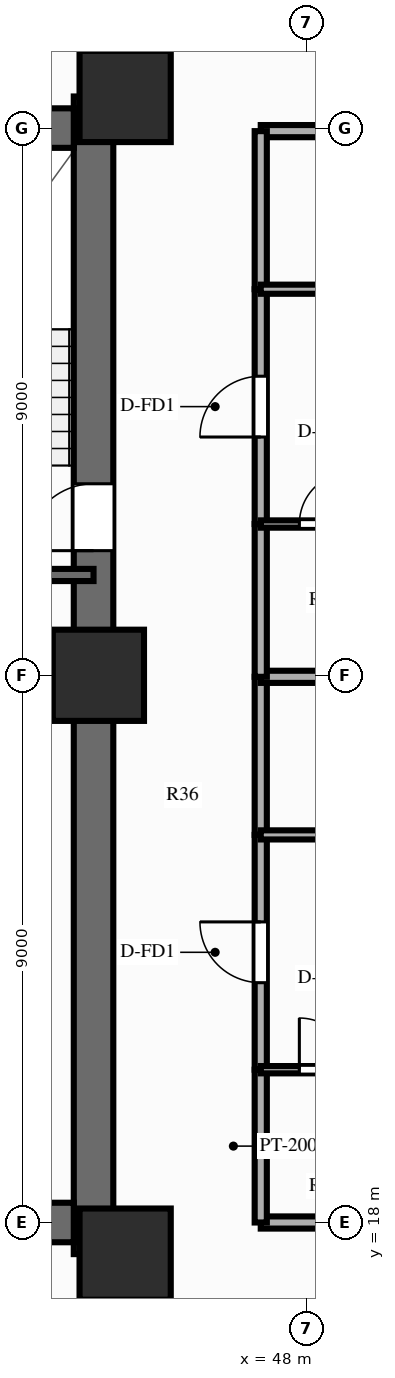
"""IFC4 building model, lengths in metres.
Left out: names, types, materials, properties, quantities, classifications, styles, units other than length and angle.
Written with IfcOpenShell. Run it as: python <this file> out.ifc"""

import sys

from ifc_helpers import new_model, si_unit, direction, frame, frame_2d, origin, origin_2d, place, context, subcontext, project, spatial, rectangle, extrude, source, transform, mapped, element, fill, save


model = new_model("IFC4")
c1 = context("Model", 3, precision=1e-05, world=origin(), true_north=direction((0.0, 1.0)))
c2 = subcontext(c1, "Body", "Model", "MODEL_VIEW")
j1 = project(units=[si_unit("LENGTHUNIT", "METRE"), si_unit("PLANEANGLEUNIT", "RADIAN")], contexts=[c1])
p1 = place(None, origin())
s1 = spatial("IfcSite", under=j1, at=p1, CompositionType="ELEMENT")
p2 = place(p1, origin())
s2 = spatial("IfcBuilding", under=s1, at=p2, CompositionType="ELEMENT")
p3 = place(p2, frame((0.0, 0.0, 22.4)))
s3 = spatial("IfcBuildingStorey", under=s2, at=p3, CompositionType="ELEMENT", Elevation=22.4)
p4 = place(p3, frame((44.5, 17.48, 0.0), z_axis=(0.0, 0.0, 1.0), x_axis=(0.0, 1.0, 0.0)))
e1 = element("IfcWall", 1, at=p4, inside=s3, PredefinedType="SHEAR", context=c2, shape_type="SweptSolid", body=[
    extrude(rectangle(XDim=19.04, YDim=0.65, at=frame_2d((9.52, 0.0))), origin(), (0.0, 0.0, 1.0), 3.0),
])
p5 = place(p4, frame((12.67, 0.0, 0.0), z_axis=(0.0, 0.0, 1.0), x_axis=(-1.0, 0.0, 0.0)))
e2 = element("IfcOpeningElement", 2, at=p5, cuts=e1, PredefinedType="OPENING", context=c2, shape_type="SweptSolid", body=[
    extrude(rectangle(XDim=1.1, YDim=2.15, at=frame_2d((0.55, 1.075))), frame((0.0, 0.337, 0.0), z_axis=(0.0, -1.0, 0.0), x_axis=(1.0, 0.0, 0.0)), (0.0, 0.0, 1.0), 0.674),
])
p6 = place(p3, frame((31.825, 18.0, 0.0), z_axis=(0.0, 0.0, 1.0), x_axis=(1.0, 0.0, 0.0)))
e3 = element("IfcWall", 3, at=p6, inside=s3, PredefinedType="SHEAR", context=c2, shape_type="SweptSolid", body=[
    extrude(rectangle(XDim=12.35, YDim=0.65, at=frame_2d((6.175, 0.0))), origin(), (0.0, 0.0, 1.0), 3.0),
])
p7 = place(p3, frame((31.825, 36.0, 0.0), z_axis=(0.0, 0.0, 1.0), x_axis=(1.0, 0.0, 0.0)))
e4 = element("IfcWall", 4, at=p7, inside=s3, PredefinedType="SHEAR", context=c2, shape_type="SweptSolid", body=[
    extrude(rectangle(XDim=12.35, YDim=0.65, at=frame_2d((6.175, 0.0))), origin(), (0.0, 0.0, 1.0), 3.0),
])
p8 = place(p7, frame((5.125, 0.0, 0.0), z_axis=(0.0, 0.0, 1.0), x_axis=(-1.0, 0.0, 0.0)))
e5 = element("IfcOpeningElement", 5, at=p8, cuts=e4, PredefinedType="OPENING", context=c2, shape_type="SweptSolid", body=[
    extrude(rectangle(XDim=1.4, YDim=2.15, at=frame_2d((0.7, 1.075))), frame((0.0, 0.337, 0.0), z_axis=(0.0, -1.0, 0.0), x_axis=(1.0, 0.0, 0.0)), (0.0, 0.0, 1.0), 0.674),
])
m1 = source(origin(), c2, "Body", "SweptSolid", [
    extrude(rectangle(XDim=1.5, YDim=1.5, at=origin_2d()), origin(), (0.0, 0.0, 1.0), 3.0),
])
for number, where, z_axis, x_axis in (
    (6, (45.02, 17.48, 0.0), (0.0, 0.0, 1.0), (1.0, 0.0, 0.0)),
    (7, (45.02, 36.52, 0.0), (0.0, 0.0, 1.0), (1.0, 0.0, 0.0)),
    (8, (44.58, 27.0, 0.0), (0.0, 0.0, 1.0), (1.0, 0.0, 0.0)),
):
    element("IfcColumn", number, at=place(p3, frame(where, z_axis=z_axis, x_axis=x_axis)), inside=s3, PredefinedType="COLUMN", context=c2, shape_type="MappedRepresentation", body=[
        mapped(m1, transform((0.0, 0.0, 0.0), scale=1.0)),
    ])
p9 = place(p3, frame((40.57, 28.65, 0.0), z_axis=(0.0, 0.0, 1.0), x_axis=(1.0, 0.0, 0.0)))
e9 = element("IfcWall", 9, at=p9, inside=s3, PredefinedType="SOLIDWALL", context=c2, shape_type="SweptSolid", body=[
    extrude(rectangle(XDim=3.93, YDim=0.2, at=frame_2d((1.965, 0.0))), origin(), (0.0, 0.0, 1.0), 2.79),
])
for number, where, z_axis, x_axis in (
    (10, (47.25, 18.0, 0.0), (0.0, 0.0, 1.0), (1.0, 0.0, 0.0)),
    (11, (47.25, 35.95, 0.0), (0.0, 0.0, 1.0), (1.0, 0.0, 0.0)),
):
    element("IfcWall", number, at=place(p3, frame(where, z_axis=z_axis, x_axis=x_axis)), inside=s3, PredefinedType="PARTITIONING", context=c2, shape_type="SweptSolid", body=[
        extrude(rectangle(XDim=16.6, YDim=0.2, at=frame_2d((8.3, 0.0))), origin(), (0.0, 0.0, 1.0), 2.24),
    ])
p10 = place(p3, frame((47.25, 18.0, 0.0), z_axis=(0.0, 0.0, 1.0), x_axis=(0.0, 1.0, 0.0)))
e12 = element("IfcWall", 12, at=p10, inside=s3, PredefinedType="PARTITIONING", context=c2, shape_type="SweptSolid", body=[
    extrude(rectangle(XDim=2.513, YDim=0.2, at=frame_2d((1.256, 0.0))), origin(), (0.0, 0.0, 1.0), 2.79),
])
p11 = place(p3, frame((47.25, 20.513, 0.0), z_axis=(0.0, 0.0, 1.0), x_axis=(0.0, 1.0, 0.0)))
e13 = element("IfcWall", 13, at=p11, inside=s3, PredefinedType="PARTITIONING", context=c2, shape_type="SweptSolid", body=[
    extrude(rectangle(XDim=3.862, YDim=0.2, at=frame_2d((1.931, 0.0))), origin(), (0.0, 0.0, 1.0), 2.79),
])
p12 = place(p11, frame((1.431, 0.0, 0.0)))
e14 = element("IfcOpeningElement", 14, at=p12, cuts=e13, PredefinedType="OPENING", context=c2, shape_type="SweptSolid", body=[
    extrude(rectangle(XDim=1.0, YDim=2.15, at=frame_2d((0.5, 1.075))), frame((0.0, 0.112, 0.0), z_axis=(0.0, -1.0, 0.0), x_axis=(1.0, 0.0, 0.0)), (0.0, 0.0, 1.0), 0.224),
])
p13 = place(p3, frame((47.25, 24.375, 0.0), z_axis=(0.0, 0.0, 1.0), x_axis=(0.0, 1.0, 0.0)))
e15 = element("IfcWall", 15, at=p13, inside=s3, PredefinedType="PARTITIONING", context=c2, shape_type="SweptSolid", body=[
    extrude(rectangle(XDim=2.6, YDim=0.2, at=frame_2d((1.3, 0.0))), origin(), (0.0, 0.0, 1.0), 2.79),
])
p14 = place(p3, frame((47.25, 20.513, 0.0), z_axis=(0.0, 0.0, 1.0), x_axis=(1.0, 0.0, 0.0)))
e16 = element("IfcWall", 16, at=p14, inside=s3, PredefinedType="PARTITIONING", context=c2, shape_type="SweptSolid", body=[
    extrude(rectangle(XDim=2.12, YDim=0.12, at=frame_2d((1.06, 0.0))), origin(), (0.0, 0.0, 1.0), 2.79),
])
p15 = place(p14, frame((0.635, 0.0, 0.0)))
e17 = element("IfcOpeningElement", 17, at=p15, cuts=e16, PredefinedType="OPENING", context=c2, shape_type="SweptSolid", body=[
    extrude(rectangle(XDim=0.85, YDim=2.05, at=frame_2d((0.425, 1.025))), frame((0.0, 0.072, 0.0), z_axis=(0.0, -1.0, 0.0), x_axis=(1.0, 0.0, 0.0)), (0.0, 0.0, 1.0), 0.144),
])
p16 = place(p3, frame((47.25, 24.375, 0.0), z_axis=(0.0, 0.0, 1.0), x_axis=(1.0, 0.0, 0.0)))
e18 = element("IfcWall", 18, at=p16, inside=s3, PredefinedType="PARTITIONING", context=c2, shape_type="SweptSolid", body=[
    extrude(rectangle(XDim=3.07, YDim=0.15, at=frame_2d((1.535, 0.0))), origin(), (0.0, 0.0, 1.0), 2.79),
])
p17 = place(p16, frame((1.085, 0.0, 0.0)))
e19 = element("IfcOpeningElement", 19, at=p17, cuts=e18, PredefinedType="OPENING", context=c2, shape_type="SweptSolid", body=[
    extrude(rectangle(XDim=0.9, YDim=2.1, at=frame_2d((0.45, 1.05))), frame((0.0, 0.087, 0.0), z_axis=(0.0, -1.0, 0.0), x_axis=(1.0, 0.0, 0.0)), (0.0, 0.0, 1.0), 0.174),
])
p18 = place(p3, frame((47.25, 26.975, 0.0), z_axis=(0.0, 0.0, 1.0), x_axis=(1.0, 0.0, 0.0)))
e20 = element("IfcWall", 20, at=p18, inside=s3, PredefinedType="PARTITIONING", context=c2, shape_type="SweptSolid", body=[
    extrude(rectangle(XDim=16.6, YDim=0.2, at=frame_2d((8.3, 0.0))), origin(), (0.0, 0.0, 1.0), 2.79),
])
p19 = place(p3, frame((47.25, 26.975, 0.0), z_axis=(0.0, 0.0, 1.0), x_axis=(0.0, 1.0, 0.0)))
e21 = element("IfcWall", 21, at=p19, inside=s3, PredefinedType="PARTITIONING", context=c2, shape_type="SweptSolid", body=[
    extrude(rectangle(XDim=2.513, YDim=0.2, at=frame_2d((1.256, 0.0))), origin(), (0.0, 0.0, 1.0), 2.79),
])
p20 = place(p3, frame((47.25, 29.488, 0.0), z_axis=(0.0, 0.0, 1.0), x_axis=(0.0, 1.0, 0.0)))
e22 = element("IfcWall", 22, at=p20, inside=s3, PredefinedType="PARTITIONING", context=c2, shape_type="SweptSolid", body=[
    extrude(rectangle(XDim=3.862, YDim=0.2, at=frame_2d((1.931, 0.0))), origin(), (0.0, 0.0, 1.0), 2.79),
])
p21 = place(p20, frame((1.431, 0.0, 0.0)))
e23 = element("IfcOpeningElement", 23, at=p21, cuts=e22, PredefinedType="OPENING", context=c2, shape_type="SweptSolid", body=[
    extrude(rectangle(XDim=1.0, YDim=2.15, at=frame_2d((0.5, 1.075))), frame((0.0, 0.112, 0.0), z_axis=(0.0, -1.0, 0.0), x_axis=(1.0, 0.0, 0.0)), (0.0, 0.0, 1.0), 0.224),
])
p22 = place(p3, frame((47.25, 33.35, 0.0), z_axis=(0.0, 0.0, 1.0), x_axis=(0.0, 1.0, 0.0)))
e24 = element("IfcWall", 24, at=p22, inside=s3, PredefinedType="PARTITIONING", context=c2, shape_type="SweptSolid", body=[
    extrude(rectangle(XDim=2.6, YDim=0.2, at=frame_2d((1.3, 0.0))), origin(), (0.0, 0.0, 1.0), 2.79),
])
p23 = place(p3, frame((47.25, 29.488, 0.0), z_axis=(0.0, 0.0, 1.0), x_axis=(1.0, 0.0, 0.0)))
e25 = element("IfcWall", 25, at=p23, inside=s3, PredefinedType="PARTITIONING", context=c2, shape_type="SweptSolid", body=[
    extrude(rectangle(XDim=2.12, YDim=0.12, at=frame_2d((1.06, 0.0))), origin(), (0.0, 0.0, 1.0), 2.79),
])
p24 = place(p23, frame((0.635, 0.0, 0.0)))
e26 = element("IfcOpeningElement", 26, at=p24, cuts=e25, PredefinedType="OPENING", context=c2, shape_type="SweptSolid", body=[
    extrude(rectangle(XDim=0.85, YDim=2.05, at=frame_2d((0.425, 1.025))), frame((0.0, 0.072, 0.0), z_axis=(0.0, -1.0, 0.0), x_axis=(1.0, 0.0, 0.0)), (0.0, 0.0, 1.0), 0.144),
])
p25 = place(p3, frame((47.25, 33.35, 0.0), z_axis=(0.0, 0.0, 1.0), x_axis=(1.0, 0.0, 0.0)))
e27 = element("IfcWall", 27, at=p25, inside=s3, PredefinedType="PARTITIONING", context=c2, shape_type="SweptSolid", body=[
    extrude(rectangle(XDim=3.07, YDim=0.15, at=frame_2d((1.535, 0.0))), origin(), (0.0, 0.0, 1.0), 2.79),
])
p26 = place(p25, frame((1.085, 0.0, 0.0)))
e28 = element("IfcOpeningElement", 28, at=p26, cuts=e27, PredefinedType="OPENING", context=c2, shape_type="SweptSolid", body=[
    extrude(rectangle(XDim=0.9, YDim=2.1, at=frame_2d((0.45, 1.05))), frame((0.0, 0.087, 0.0), z_axis=(0.0, -1.0, 0.0), x_axis=(1.0, 0.0, 0.0)), (0.0, 0.0, 1.0), 0.174),
])
m2 = source(origin(), c2, "Body", "SweptSolid", [
    extrude(rectangle(XDim=1.1, YDim=2.15, at=frame_2d((0.55, 1.075))), frame((0.0, 0.025, 0.0), z_axis=(0.0, -1.0, 0.0), x_axis=(1.0, 0.0, 0.0)), (0.0, 0.0, 1.0), 0.05),
])
p27 = place(p5, origin())
e29 = element("IfcDoor", 29, at=p27, inside=s3, OperationType="SINGLE_SWING_RIGHT", PredefinedType="DOOR", context=c2, shape_type="MappedRepresentation", body=[
    mapped(m2, transform((0.0, 0.0, 0.0), scale=1.0)),
])
fill(e2, e29)
m3 = source(origin(), c2, "Body", "SweptSolid", [
    extrude(rectangle(XDim=1.0, YDim=2.15, at=frame_2d((0.5, 1.075))), frame((0.0, 0.025, 0.0), z_axis=(0.0, -1.0, 0.0), x_axis=(1.0, 0.0, 0.0)), (0.0, 0.0, 1.0), 0.05),
])
p28 = place(p12, origin())
e30 = element("IfcDoor", 30, at=p28, inside=s3, OperationType="SINGLE_SWING_RIGHT", PredefinedType="DOOR", context=c2, shape_type="MappedRepresentation", body=[
    mapped(m3, transform((0.0, 0.0, 0.0), scale=1.0)),
])
fill(e14, e30)
m4 = source(origin(), c2, "Body", "SweptSolid", [
    extrude(rectangle(XDim=0.85, YDim=2.05, at=frame_2d((0.425, 1.025))), frame((0.0, 0.025, 0.0), z_axis=(0.0, -1.0, 0.0), x_axis=(1.0, 0.0, 0.0)), (0.0, 0.0, 1.0), 0.05),
])
p29 = place(p15, origin())
e31 = element("IfcDoor", 31, at=p29, inside=s3, OperationType="SINGLE_SWING_LEFT", PredefinedType="DOOR", context=c2, shape_type="MappedRepresentation", body=[
    mapped(m4, transform((0.0, 0.0, 0.0), scale=1.0)),
])
fill(e17, e31)
p30 = place(p21, origin())
e32 = element("IfcDoor", 32, at=p30, inside=s3, OperationType="SINGLE_SWING_LEFT", PredefinedType="DOOR", context=c2, shape_type="MappedRepresentation", body=[
    mapped(m3, transform((0.0, 0.0, 0.0), scale=1.0)),
])
fill(e23, e32)
p31 = place(p24, origin())
e33 = element("IfcDoor", 33, at=p31, inside=s3, OperationType="SINGLE_SWING_RIGHT", PredefinedType="DOOR", context=c2, shape_type="MappedRepresentation", body=[
    mapped(m4, transform((0.0, 0.0, 0.0), scale=1.0)),
])
fill(e26, e33)
save(model, sys.argv[1])
